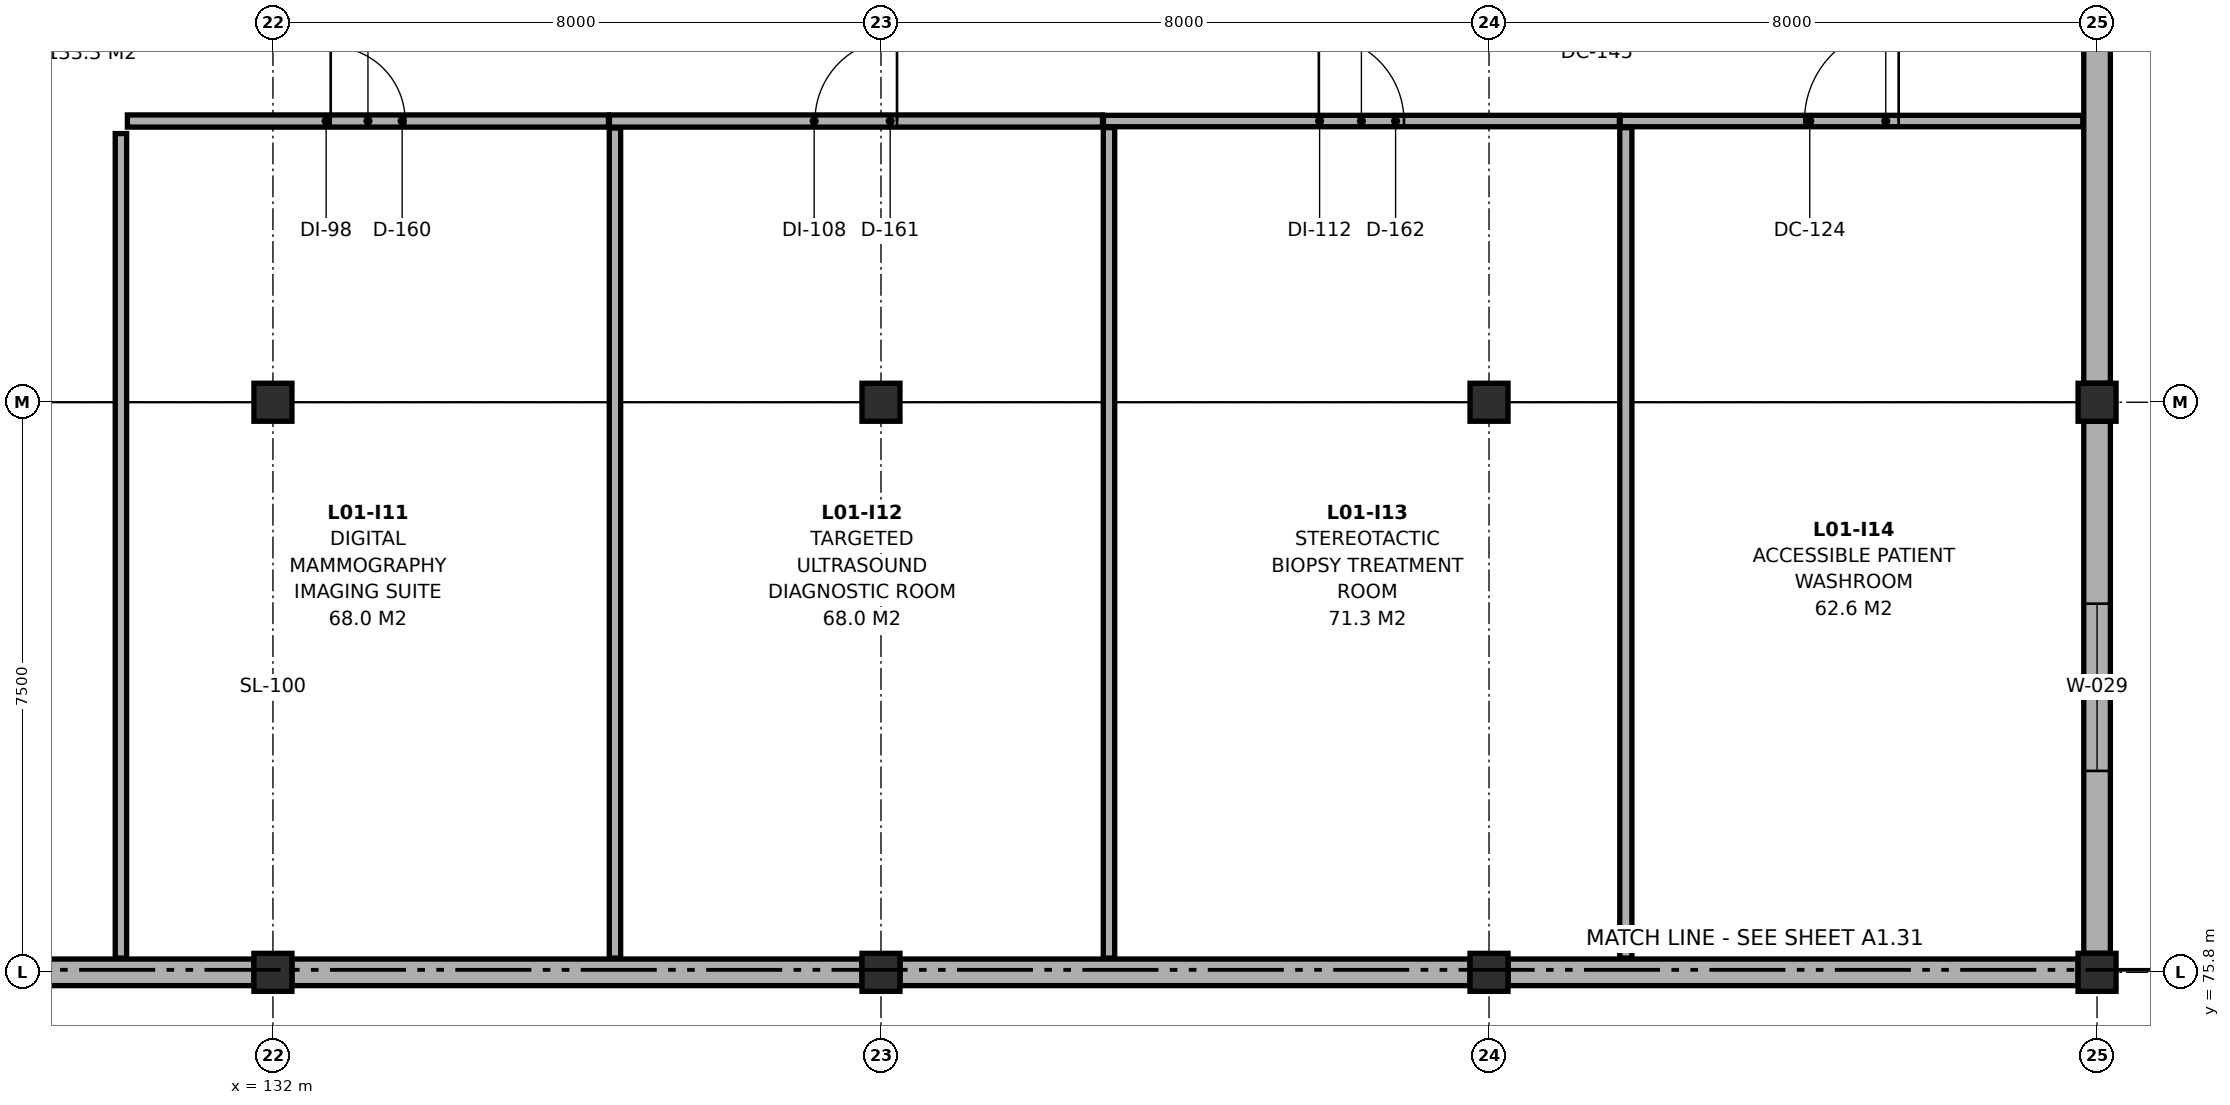
"""IFC4 building model, lengths in metres.
Left out: names, types, materials, properties, quantities, classifications, styles, units other than length and angle.
Written with IfcOpenShell. Run it as: python <this file> out.ifc"""

import sys

from ifc_helpers import new_model, si_unit, direction, frame, frame_2d, origin, origin_2d, place, context, subcontext, project, spatial, rectangle, extrude, element, fill, save


model = new_model("IFC4")
c1 = context("Model", 3, precision=1e-05, world=origin(), true_north=direction((0.0, 1.0)))
c2 = subcontext(c1, "Body", "Model", "MODEL_VIEW")
j1 = project(units=[si_unit("LENGTHUNIT", "METRE"), si_unit("PLANEANGLEUNIT", "RADIAN")], contexts=[c1])
p1 = place(None, origin())
s1 = spatial("IfcSite", under=j1, at=p1, CompositionType="ELEMENT")
p2 = place(p1, origin())
s2 = spatial("IfcBuilding", under=s1, at=p2, CompositionType="ELEMENT")
p3 = place(p2, frame((0.0, 0.0, 5.0)))
s3 = spatial("IfcBuildingStorey", under=s2, at=p3, CompositionType="ELEMENT", Elevation=5.0)
p4 = place(p3, frame((132.0, 75.8, 0.0), z_axis=(0.0, 0.0, 1.0), x_axis=(1.0, 0.0, 0.0)))
e1 = element("IfcColumn", 1, at=p4, inside=s3, PredefinedType="COLUMN", context=c2, shape_type="SweptSolid", body=[
    extrude(rectangle(XDim=0.5, YDim=0.5, at=origin_2d()), origin(), (0.0, 0.0, 1.0), 4.356),
])
p5 = place(p3, frame((132.0, 83.3, 0.0), z_axis=(0.0, 0.0, 1.0), x_axis=(1.0, 0.0, 0.0)))
e2 = element("IfcColumn", 2, at=p5, inside=s3, PredefinedType="COLUMN", context=c2, shape_type="SweptSolid", body=[
    extrude(rectangle(XDim=0.5, YDim=0.5, at=origin_2d()), origin(), (0.0, 0.0, 1.0), 5.5),
])
p6 = place(p3, frame((140.0, 75.8, 0.0), z_axis=(0.0, 0.0, 1.0), x_axis=(1.0, 0.0, 0.0)))
e3 = element("IfcColumn", 3, at=p6, inside=s3, PredefinedType="COLUMN", context=c2, shape_type="SweptSolid", body=[
    extrude(rectangle(XDim=0.5, YDim=0.5, at=origin_2d()), origin(), (0.0, 0.0, 1.0), 4.356),
])
p7 = place(p3, frame((140.0, 83.3, 0.0), z_axis=(0.0, 0.0, 1.0), x_axis=(1.0, 0.0, 0.0)))
e4 = element("IfcColumn", 4, at=p7, inside=s3, PredefinedType="COLUMN", context=c2, shape_type="SweptSolid", body=[
    extrude(rectangle(XDim=0.5, YDim=0.5, at=origin_2d()), origin(), (0.0, 0.0, 1.0), 5.5),
])
p8 = place(p3, frame((148.0, 75.8, 0.0), z_axis=(0.0, 0.0, 1.0), x_axis=(1.0, 0.0, 0.0)))
e5 = element("IfcColumn", 5, at=p8, inside=s3, PredefinedType="COLUMN", context=c2, shape_type="SweptSolid", body=[
    extrude(rectangle(XDim=0.5, YDim=0.5, at=origin_2d()), origin(), (0.0, 0.0, 1.0), 4.356),
])
p9 = place(p3, frame((148.0, 83.3, 0.0), z_axis=(0.0, 0.0, 1.0), x_axis=(1.0, 0.0, 0.0)))
e6 = element("IfcColumn", 6, at=p9, inside=s3, PredefinedType="COLUMN", context=c2, shape_type="SweptSolid", body=[
    extrude(rectangle(XDim=0.5, YDim=0.5, at=origin_2d()), origin(), (0.0, 0.0, 1.0), 5.5),
])
p10 = place(p3, frame((156.0, 75.8, 0.0), z_axis=(0.0, 0.0, 1.0), x_axis=(1.0, 0.0, 0.0)))
e7 = element("IfcColumn", 7, at=p10, inside=s3, PredefinedType="COLUMN", context=c2, shape_type="SweptSolid", body=[
    extrude(rectangle(XDim=0.5, YDim=0.5, at=origin_2d()), origin(), (0.0, 0.0, 1.0), 4.356),
])
p11 = place(p3, frame((156.0, 83.3, 0.0), z_axis=(0.0, 0.0, 1.0), x_axis=(1.0, 0.0, 0.0)))
e8 = element("IfcColumn", 8, at=p11, inside=s3, PredefinedType="COLUMN", context=c2, shape_type="SweptSolid", body=[
    extrude(rectangle(XDim=0.5, YDim=0.5, at=origin_2d()), origin(), (0.0, 0.0, 1.0), 5.5),
])
p12 = place(p3, frame((156.0, 90.55, 0.0), z_axis=(0.0, 0.0, 1.0), x_axis=(0.0, -1.0, 0.0)))
e9 = element("IfcWall", 9, at=p12, inside=s3, PredefinedType="SOLIDWALL", context=c2, shape_type="SweptSolid", body=[
    extrude(rectangle(XDim=7.0, YDim=0.35, at=frame_2d((3.5, 0.0))), origin(), (0.0, 0.0, 1.0), 4.2),
])
p13 = place(p3, frame((156.0, 83.05, 0.0), z_axis=(0.0, 0.0, 1.0), x_axis=(0.0, -1.0, 0.0)))
e10 = element("IfcWall", 10, at=p13, inside=s3, PredefinedType="SOLIDWALL", context=c2, shape_type="SweptSolid", body=[
    extrude(rectangle(XDim=7.0, YDim=0.35, at=frame_2d((3.5, 0.0))), origin(), (0.0, 0.0, 1.0), 4.2),
])
p14 = place(p13, frame((2.4, 0.0, 0.9)))
e11 = element("IfcOpeningElement", 11, at=p14, cuts=e10, PredefinedType="OPENING", context=c2, shape_type="SweptSolid", body=[
    extrude(rectangle(XDim=2.2, YDim=1.3, at=frame_2d((1.1, 0.65))), frame((0.0, 0.187, 0.0), z_axis=(0.0, -1.0, 0.0), x_axis=(1.0, 0.0, 0.0)), (0.0, 0.0, 1.0), 0.374),
])
p15 = place(p3, frame((155.75, 75.8, 0.0), z_axis=(0.0, 0.0, 1.0), x_axis=(-1.0, 0.0, 0.0)))
e12 = element("IfcWall", 12, at=p15, inside=s3, PredefinedType="SOLIDWALL", context=c2, shape_type="SweptSolid", body=[
    extrude(rectangle(XDim=7.5, YDim=0.35, at=frame_2d((3.75, 0.0))), origin(), (0.0, 0.0, 1.0), 4.2),
])
for number, where, z_axis, x_axis in (
    (13, (147.75, 75.8, 0.0), (0.0, 0.0, 1.0), (-1.0, 0.0, 0.0)),
    (14, (139.75, 75.8, 0.0), (0.0, 0.0, 1.0), (-1.0, 0.0, 0.0)),
    (15, (131.75, 75.8, 0.0), (0.0, 0.0, 1.0), (-1.0, 0.0, 0.0)),
):
    element("IfcWall", number, at=place(p3, frame(where, z_axis=z_axis, x_axis=x_axis)), inside=s3, PredefinedType="SOLIDWALL", context=c2, shape_type="SweptSolid", body=[
        extrude(rectangle(XDim=7.5, YDim=0.35, at=frame_2d((3.75, 0.0))), origin(), (0.0, 0.0, 1.0), 3.655),
    ])
p16 = place(p3, frame((130.085, 87.0, 0.0), z_axis=(0.0, 0.0, 1.0), x_axis=(1.0, 0.0, 0.0)))
e16 = element("IfcWall", 16, at=p16, inside=s3, PredefinedType="PARTITIONING", context=c2, shape_type="SweptSolid", body=[
    extrude(rectangle(XDim=6.33, YDim=0.16, at=frame_2d((3.165, 0.0))), origin(), (0.0, 0.0, 1.0), 4.175),
])
p17 = place(p16, frame((2.675, 0.0, 0.0)))
e17 = element("IfcOpeningElement", 17, at=p17, cuts=e16, PredefinedType="OPENING", context=c2, shape_type="SweptSolid", body=[
    extrude(rectangle(XDim=0.98, YDim=2.12, at=frame_2d((0.49, 1.06))), frame((0.0, 0.092, 0.0), z_axis=(0.0, -1.0, 0.0), x_axis=(1.0, 0.0, 0.0)), (0.0, 0.0, 1.0), 0.184),
])
p18 = place(p3, frame((136.427, 87.0, 0.0), z_axis=(0.0, 0.0, 1.0), x_axis=(1.0, 0.0, 0.0)))
e18 = element("IfcWall", 18, at=p18, inside=s3, PredefinedType="PARTITIONING", context=c2, shape_type="SweptSolid", body=[
    extrude(rectangle(XDim=6.488, YDim=0.16, at=frame_2d((3.244, 0.0))), origin(), (0.0, 0.0, 1.0), 4.175),
])
p19 = place(p18, frame((2.704, 0.0, 0.0)))
e19 = element("IfcOpeningElement", 19, at=p19, cuts=e18, PredefinedType="OPENING", context=c2, shape_type="SweptSolid", body=[
    extrude(rectangle(XDim=1.08, YDim=2.18, at=frame_2d((0.54, 1.09))), frame((0.0, 0.092, 0.0), z_axis=(0.0, -1.0, 0.0), x_axis=(1.0, 0.0, 0.0)), (0.0, 0.0, 1.0), 0.184),
])
p20 = place(p3, frame((142.927, 87.0, 0.0), z_axis=(0.0, 0.0, 1.0), x_axis=(1.0, 0.0, 0.0)))
e20 = element("IfcWall", 20, at=p20, inside=s3, PredefinedType="PARTITIONING", context=c2, shape_type="SweptSolid", body=[
    extrude(rectangle(XDim=6.788, YDim=0.15, at=frame_2d((3.394, 0.0))), origin(), (0.0, 0.0, 1.0), 4.2),
])
p21 = place(p20, frame((2.834, 0.0, 0.0)))
e21 = element("IfcOpeningElement", 21, at=p21, cuts=e20, PredefinedType="OPENING", context=c2, shape_type="SweptSolid", body=[
    extrude(rectangle(XDim=1.12, YDim=2.2, at=frame_2d((0.56, 1.1))), frame((0.0, 0.087, 0.0), z_axis=(0.0, -1.0, 0.0), x_axis=(1.0, 0.0, 0.0)), (0.0, 0.0, 1.0), 0.174),
])
p22 = place(p3, frame((149.727, 87.0, 0.0), z_axis=(0.0, 0.0, 1.0), x_axis=(1.0, 0.0, 0.0)))
e22 = element("IfcWall", 22, at=p22, inside=s3, PredefinedType="PARTITIONING", context=c2, shape_type="SweptSolid", body=[
    extrude(rectangle(XDim=6.086, YDim=0.15, at=frame_2d((3.043, 0.0))), origin(), (0.0, 0.0, 1.0), 4.2),
])
p23 = place(p22, frame((2.423, 0.0, 0.0)))
e23 = element("IfcOpeningElement", 23, at=p23, cuts=e22, PredefinedType="OPENING", context=c2, shape_type="SweptSolid", body=[
    extrude(rectangle(XDim=1.24, YDim=2.2, at=frame_2d((0.62, 1.1))), frame((0.0, 0.087, 0.0), z_axis=(0.0, -1.0, 0.0), x_axis=(1.0, 0.0, 0.0)), (0.0, 0.0, 1.0), 0.174),
])
p24 = place(p3, frame((130.0, 75.987, 0.0), z_axis=(0.0, 0.0, 1.0), x_axis=(0.0, 1.0, 0.0)))
e24 = element("IfcWall", 24, at=p24, inside=s3, PredefinedType="PARTITIONING", context=c2, shape_type="SweptSolid", body=[
    extrude(rectangle(XDim=10.848, YDim=0.15, at=frame_2d((5.424, 0.0))), origin(), (0.0, 0.0, 1.0), 4.2),
])
p25 = place(p3, frame((136.5, 75.987, 0.0), z_axis=(0.0, 0.0, 1.0), x_axis=(0.0, 1.0, 0.0)))
e25 = element("IfcWall", 25, at=p25, inside=s3, PredefinedType="PARTITIONING", context=c2, shape_type="SweptSolid", body=[
    extrude(rectangle(XDim=10.921, YDim=0.15, at=frame_2d((5.46, 0.0))), origin(), (0.0, 0.0, 1.0), 4.2),
])
p26 = place(p3, frame((143.0, 75.987, 0.0), z_axis=(0.0, 0.0, 1.0), x_axis=(0.0, 1.0, 0.0)))
e26 = element("IfcWall", 26, at=p26, inside=s3, PredefinedType="PARTITIONING", context=c2, shape_type="SweptSolid", body=[
    extrude(rectangle(XDim=10.926, YDim=0.15, at=frame_2d((5.463, 0.0))), origin(), (0.0, 0.0, 1.0), 4.2),
])
p27 = place(p3, frame((149.8, 75.987, 0.0), z_axis=(0.0, 0.0, 1.0), x_axis=(0.0, 1.0, 0.0)))
e27 = element("IfcWall", 27, at=p27, inside=s3, PredefinedType="PARTITIONING", context=c2, shape_type="SweptSolid", body=[
    extrude(rectangle(XDim=10.926, YDim=0.16, at=frame_2d((5.463, 0.0))), origin(), (0.0, 0.0, 1.0), 4.2),
])
p28 = place(p14, origin())
e28 = element("IfcWindow", 28, at=p28, inside=s3, PartitioningType="DOUBLE_PANEL_VERTICAL", PredefinedType="WINDOW", context=c2, shape_type="SweptSolid", body=[
    extrude(rectangle(XDim=2.2, YDim=1.3, at=frame_2d((1.1, 0.65))), frame((0.0, 0.03, 0.0), z_axis=(0.0, -1.0, 0.0), x_axis=(1.0, 0.0, 0.0)), (0.0, 0.0, 1.0), 0.06),
])
fill(e11, e28)
p29 = place(p17, origin())
e29 = element("IfcDoor", 29, at=p29, inside=s3, OperationType="SINGLE_SWING_LEFT", PredefinedType="DOOR", context=c2, shape_type="SweptSolid", body=[
    extrude(rectangle(XDim=0.98, YDim=2.12, at=frame_2d((0.49, 1.06))), frame((0.0, 0.025, 0.0), z_axis=(0.0, -1.0, 0.0), x_axis=(1.0, 0.0, 0.0)), (0.0, 0.0, 1.0), 0.05),
])
fill(e17, e29)
p30 = place(p19, origin())
e30 = element("IfcDoor", 30, at=p30, inside=s3, OperationType="SINGLE_SWING_RIGHT", PredefinedType="DOOR", context=c2, shape_type="SweptSolid", body=[
    extrude(rectangle(XDim=1.08, YDim=2.18, at=frame_2d((0.54, 1.09))), frame((0.0, 0.025, 0.0), z_axis=(0.0, -1.0, 0.0), x_axis=(1.0, 0.0, 0.0)), (0.0, 0.0, 1.0), 0.05),
])
fill(e19, e30)
p31 = place(p21, origin())
e31 = element("IfcDoor", 31, at=p31, inside=s3, OperationType="SINGLE_SWING_LEFT", PredefinedType="DOOR", context=c2, shape_type="SweptSolid", body=[
    extrude(rectangle(XDim=1.12, YDim=2.2, at=frame_2d((0.56, 1.1))), frame((0.0, 0.025, 0.0), z_axis=(0.0, -1.0, 0.0), x_axis=(1.0, 0.0, 0.0)), (0.0, 0.0, 1.0), 0.05),
])
fill(e21, e31)
p32 = place(p23, origin())
e32 = element("IfcDoor", 32, at=p32, inside=s3, OperationType="SINGLE_SWING_RIGHT", PredefinedType="DOOR", context=c2, shape_type="SweptSolid", body=[
    extrude(rectangle(XDim=1.24, YDim=2.2, at=frame_2d((0.62, 1.1))), frame((0.0, 0.025, 0.0), z_axis=(0.0, -1.0, 0.0), x_axis=(1.0, 0.0, 0.0)), (0.0, 0.0, 1.0), 0.05),
])
fill(e23, e32)
save(model, sys.argv[1])
